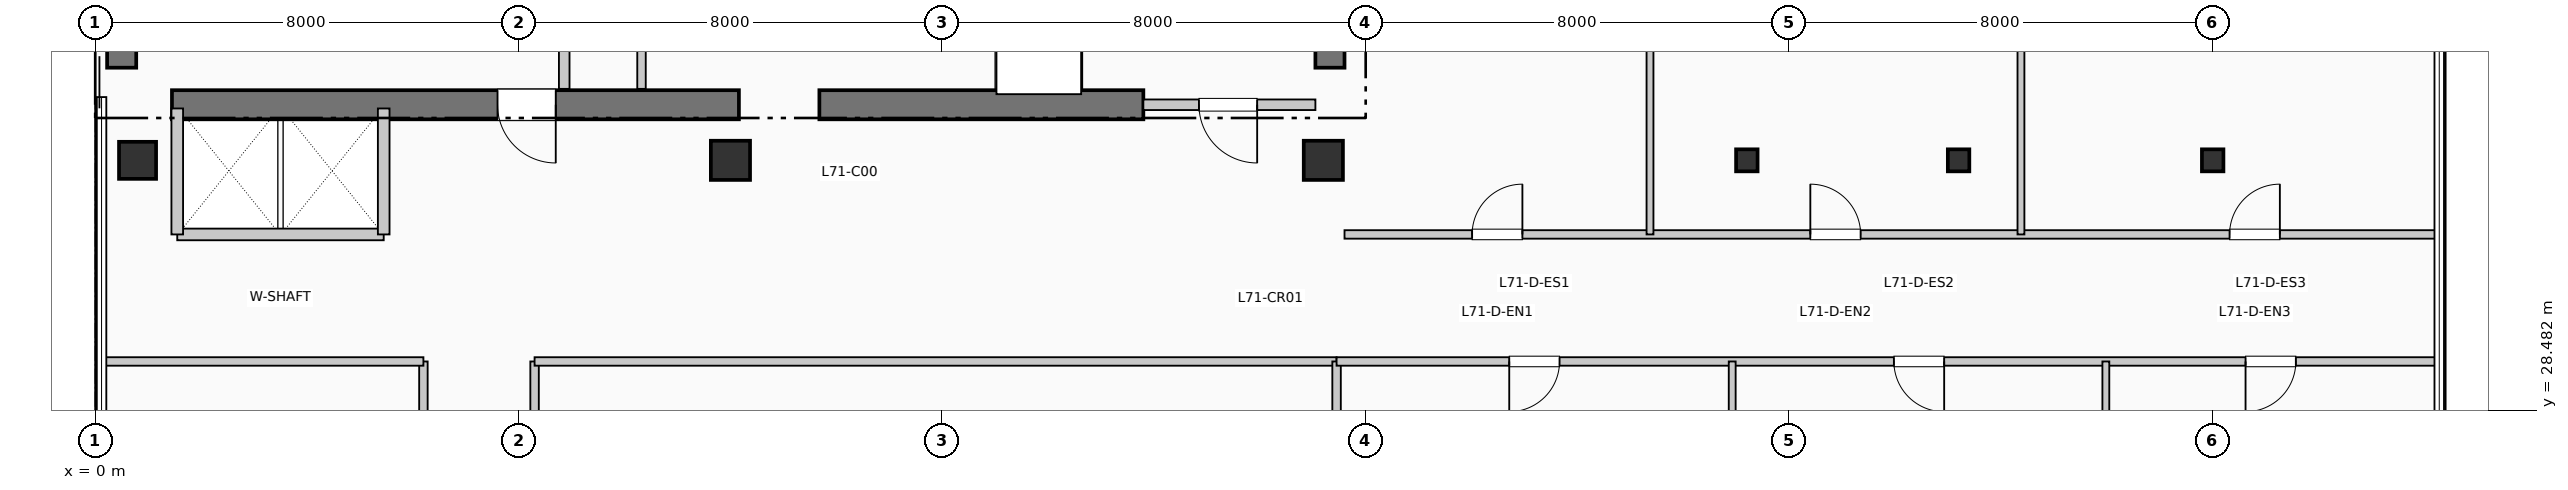
"""IFC4 building model, lengths in metres.
Left out: names, types, materials, properties, quantities, classifications, styles, units other than length and angle.
Written with IfcOpenShell. Run it as: python <this file> out.ifc"""

import sys

from ifc_helpers import new_model, si_unit, direction, frame, frame_2d, origin, origin_2d, place, context, subcontext, project, spatial, rectangle, i_section, extrude, element, fill, save


model = new_model("IFC4")
c1 = context("Model", 3, precision=1e-05, world=origin(), true_north=direction((0.0, 1.0)))
c2 = subcontext(c1, "Body", "Model", "MODEL_VIEW")
j1 = project(units=[si_unit("LENGTHUNIT", "METRE"), si_unit("PLANEANGLEUNIT", "RADIAN")], contexts=[c1])
p1 = place(None, origin())
s1 = spatial("IfcSite", under=j1, at=p1, CompositionType="ELEMENT")
p2 = place(p1, origin())
s2 = spatial("IfcBuilding", under=s1, at=p2, CompositionType="ELEMENT")
p3 = place(p2, frame((0.0, 0.0, 292.05)))
s3 = spatial("IfcBuildingStorey", under=s2, at=p3, CompositionType="ELEMENT", Elevation=292.05)
p4 = place(p3, frame((0.5, 34.95, 0.0), z_axis=(0.0, 0.0, 1.0), x_axis=(0.0, 1.0, 0.0)))
e1 = element("IfcWall", 1, at=p4, inside=s3, PredefinedType="SHEAR", context=c2, shape_type="SweptSolid", body=[
    extrude(rectangle(XDim=7.9, YDim=0.55, at=frame_2d((3.95, 0.0))), origin(), (0.0, 0.0, 1.0), 3.96),
])
p5 = place(p3, frame((23.325, 34.95, 0.0), z_axis=(0.0, 0.0, 1.0), x_axis=(0.0, 1.0, 0.0)))
e2 = element("IfcWall", 2, at=p5, inside=s3, PredefinedType="SHEAR", context=c2, shape_type="SweptSolid", body=[
    extrude(rectangle(XDim=10.64, YDim=0.55, at=frame_2d((5.32, 0.0))), origin(), (0.0, 0.0, 1.0), 3.96),
])
p6 = place(p3, frame((1.45, 34.25, 0.0), z_axis=(0.0, 0.0, 1.0), x_axis=(1.0, 0.0, 0.0)))
e3 = element("IfcWall", 3, at=p6, inside=s3, PredefinedType="SHEAR", context=c2, shape_type="SweptSolid", body=[
    extrude(rectangle(XDim=10.71, YDim=0.55, at=frame_2d((5.355, 0.0))), origin(), (0.0, 0.0, 1.0), 3.96),
])
p7 = place(p6, frame((7.25, 0.0, 0.0), z_axis=(0.0, 0.0, 1.0), x_axis=(-1.0, 0.0, 0.0)))
e4 = element("IfcOpeningElement", 4, at=p7, cuts=e3, PredefinedType="OPENING", context=c2, shape_type="SweptSolid", body=[
    extrude(rectangle(XDim=1.1, YDim=2.15, at=frame_2d((0.55, 1.075))), frame((0.0, 0.285, 0.0), z_axis=(0.0, -1.0, 0.0), x_axis=(1.0, 0.0, 0.0)), (0.0, 0.0, 1.0), 0.57),
])
p8 = place(p3, frame((13.68, 34.25, 0.0), z_axis=(0.0, 0.0, 1.0), x_axis=(1.0, 0.0, 0.0)))
e5 = element("IfcWall", 5, at=p8, inside=s3, PredefinedType="SHEAR", context=c2, shape_type="SweptSolid", body=[
    extrude(rectangle(XDim=6.12, YDim=0.55, at=frame_2d((3.06, 0.0))), origin(), (0.0, 0.0, 1.0), 3.96),
])
p9 = place(p3, frame((0.8, 33.2, 0.0), z_axis=(0.0, 0.0, 1.0), x_axis=(1.0, 0.0, 0.0)))
e6 = element("IfcColumn", 6, at=p9, inside=s3, PredefinedType="COLUMN", context=c2, shape_type="SweptSolid", body=[
    extrude(rectangle(XDim=0.7, YDim=0.7, at=origin_2d()), origin(), (0.0, 0.0, 1.0), 3.96),
])
for number, where, z_axis, x_axis in (
    (7, (12.0, 33.2, 0.0), (0.0, 0.0, 1.0), (1.0, 0.0, 0.0)),
    (8, (23.2, 33.2, 0.0), (0.0, 0.0, 1.0), (1.0, 0.0, 0.0)),
):
    element("IfcColumn", number, at=place(p3, frame(where, z_axis=z_axis, x_axis=x_axis)), inside=s3, PredefinedType="COLUMN", context=c2, shape_type="SweptSolid", body=[
        extrude(rectangle(XDim=0.74, YDim=0.74, at=origin_2d()), origin(), (0.0, 0.0, 1.0), 3.96),
    ])
for number, where, z_axis, x_axis in (
    (9, (31.2, 33.2, 0.0), (0.0, 0.0, 1.0), (1.0, 0.0, 0.0)),
    (10, (35.2, 33.2, 0.0), (0.0, 0.0, 1.0), (1.0, 0.0, 0.0)),
    (11, (40.0, 33.2, 0.0), (0.0, 0.0, 1.0), (1.0, 0.0, 0.0)),
):
    element("IfcColumn", number, at=place(p3, frame(where, z_axis=z_axis, x_axis=x_axis)), inside=s3, PredefinedType="COLUMN", context=c2, shape_type="SweptSolid", body=[
        extrude(i_section(OverallWidth=0.406, OverallDepth=0.416, WebThickness=0.022, FlangeThickness=0.036, at=origin_2d()), origin(), (0.0, 0.0, 1.0), 3.96),
    ])
p10 = place(p3, frame((8.86, 34.55, 0.0), z_axis=(0.0, 0.0, 1.0), x_axis=(0.0, 1.0, 0.0)))
e12 = element("IfcWall", 12, at=p10, inside=s3, PredefinedType="PARTITIONING", context=c2, shape_type="SweptSolid", body=[
    extrude(rectangle(XDim=2.5, YDim=0.2, at=frame_2d((1.25, 0.0))), origin(), (0.0, 0.0, 1.0), 3.74),
])
p11 = place(p3, frame((19.8, 34.25, 0.0), z_axis=(0.0, 0.0, 1.0), x_axis=(1.0, 0.0, 0.0)))
e13 = element("IfcWall", 13, at=p11, inside=s3, PredefinedType="PARTITIONING", context=c2, shape_type="SweptSolid", body=[
    extrude(rectangle(XDim=3.25, YDim=0.2, at=frame_2d((1.625, 0.0))), origin(), (0.0, 0.0, 1.0), 3.74),
])
p12 = place(p11, frame((2.15, 0.0, 0.0), z_axis=(0.0, 0.0, 1.0), x_axis=(-1.0, 0.0, 0.0)))
e14 = element("IfcOpeningElement", 14, at=p12, cuts=e13, PredefinedType="OPENING", context=c2, shape_type="SweptSolid", body=[
    extrude(rectangle(XDim=1.1, YDim=2.15, at=frame_2d((0.55, 1.075))), frame((0.0, 0.11, 0.0), z_axis=(0.0, -1.0, 0.0), x_axis=(1.0, 0.0, 0.0)), (0.0, 0.0, 1.0), 0.22),
])
p13 = place(p3, frame((1.55, 31.8, 0.0), z_axis=(0.0, 0.0, 1.0), x_axis=(1.0, 0.0, 0.0)))
e15 = element("IfcWall", 15, at=p13, inside=s3, PredefinedType="PARTITIONING", context=c2, shape_type="SweptSolid", body=[
    extrude(rectangle(XDim=3.9, YDim=0.22, at=frame_2d((1.95, 0.0))), origin(), (0.0, 0.0, 1.0), 3.74),
])
for number, where, z_axis, x_axis in (
    (16, (1.55, 31.8, 0.0), (0.0, 0.0, 1.0), (0.0, 1.0, 0.0)),
    (17, (5.45, 31.8, 0.0), (0.0, 0.0, 1.0), (0.0, 1.0, 0.0)),
):
    element("IfcWall", number, at=place(p3, frame(where, z_axis=z_axis, x_axis=x_axis)), inside=s3, PredefinedType="PARTITIONING", context=c2, shape_type="SweptSolid", body=[
        extrude(rectangle(XDim=2.38, YDim=0.22, at=frame_2d((1.19, 0.0))), origin(), (0.0, 0.0, 1.0), 3.74),
    ])
p14 = place(p3, frame((10.32, 34.55, 0.0), z_axis=(0.0, 0.0, 1.0), x_axis=(0.0, 1.0, 0.0)))
e18 = element("IfcWall", 18, at=p14, inside=s3, PredefinedType="PARTITIONING", context=c2, shape_type="SweptSolid", body=[
    extrude(rectangle(XDim=2.15, YDim=0.16, at=frame_2d((1.075, 0.0))), origin(), (0.0, 0.0, 1.0), 3.74),
])
p15 = place(p3, frame((6.2, 10.3, 0.0), z_axis=(0.0, 0.0, 1.0), x_axis=(0.0, 1.0, 0.0)))
e19 = element("IfcWall", 19, at=p15, inside=s3, PredefinedType="PARTITIONING", context=c2, shape_type="SweptSolid", body=[
    extrude(rectangle(XDim=19.1, YDim=0.16, at=frame_2d((9.55, 0.0))), origin(), (0.0, 0.0, 1.0), 3.74),
])
p16 = place(p15, frame((3.531, 0.0, 0.0), z_axis=(0.0, 0.0, 1.0), x_axis=(-1.0, 0.0, 0.0)))
e20 = element("IfcOpeningElement", 20, at=p16, cuts=e19, PredefinedType="OPENING", context=c2, shape_type="SweptSolid", body=[
    extrude(rectangle(XDim=0.95, YDim=2.15, at=frame_2d((0.475, 1.075))), frame((0.0, 0.09, 0.0), z_axis=(0.0, -1.0, 0.0), x_axis=(1.0, 0.0, 0.0)), (0.0, 0.0, 1.0), 0.18),
])
p17 = place(p15, frame((9.739, 0.0, 0.0), z_axis=(0.0, 0.0, 1.0), x_axis=(-1.0, 0.0, 0.0)))
e21 = element("IfcOpeningElement", 21, at=p17, cuts=e19, PredefinedType="OPENING", context=c2, shape_type="SweptSolid", body=[
    extrude(rectangle(XDim=0.95, YDim=2.15, at=frame_2d((0.475, 1.075))), frame((0.0, 0.09, 0.0), z_axis=(0.0, -1.0, 0.0), x_axis=(1.0, 0.0, 0.0)), (0.0, 0.0, 1.0), 0.18),
])
p18 = place(p15, frame((16.232, 0.0, 0.0), z_axis=(0.0, 0.0, 1.0), x_axis=(-1.0, 0.0, 0.0)))
e22 = element("IfcOpeningElement", 22, at=p18, cuts=e19, PredefinedType="OPENING", context=c2, shape_type="SweptSolid", body=[
    extrude(rectangle(XDim=0.95, YDim=2.15, at=frame_2d((0.475, 1.075))), frame((0.0, 0.09, 0.0), z_axis=(0.0, -1.0, 0.0), x_axis=(1.0, 0.0, 0.0)), (0.0, 0.0, 1.0), 0.18),
])
p19 = place(p3, frame((8.3, 10.3, 0.0), z_axis=(0.0, 0.0, 1.0), x_axis=(0.0, 1.0, 0.0)))
e23 = element("IfcWall", 23, at=p19, inside=s3, PredefinedType="PARTITIONING", context=c2, shape_type="SweptSolid", body=[
    extrude(rectangle(XDim=19.1, YDim=0.16, at=frame_2d((9.55, 0.0))), origin(), (0.0, 0.0, 1.0), 3.74),
])
p20 = place(p19, frame((1.626, 0.0, 0.0)))
e24 = element("IfcOpeningElement", 24, at=p20, cuts=e23, PredefinedType="OPENING", context=c2, shape_type="SweptSolid", body=[
    extrude(rectangle(XDim=0.95, YDim=2.15, at=frame_2d((0.475, 1.075))), frame((0.0, 0.09, 0.0), z_axis=(0.0, -1.0, 0.0), x_axis=(1.0, 0.0, 0.0)), (0.0, 0.0, 1.0), 0.18),
])
p21 = place(p19, frame((6.21, 0.0, 0.0)))
e25 = element("IfcOpeningElement", 25, at=p21, cuts=e23, PredefinedType="OPENING", context=c2, shape_type="SweptSolid", body=[
    extrude(rectangle(XDim=0.95, YDim=2.15, at=frame_2d((0.475, 1.075))), frame((0.0, 0.09, 0.0), z_axis=(0.0, -1.0, 0.0), x_axis=(1.0, 0.0, 0.0)), (0.0, 0.0, 1.0), 0.18),
])
p22 = place(p19, frame((11.367, 0.0, 0.0)))
e26 = element("IfcOpeningElement", 26, at=p22, cuts=e23, PredefinedType="OPENING", context=c2, shape_type="SweptSolid", body=[
    extrude(rectangle(XDim=0.95, YDim=2.15, at=frame_2d((0.475, 1.075))), frame((0.0, 0.09, 0.0), z_axis=(0.0, -1.0, 0.0), x_axis=(1.0, 0.0, 0.0)), (0.0, 0.0, 1.0), 0.18),
])
p23 = place(p19, frame((16.333, 0.0, 0.0)))
e27 = element("IfcOpeningElement", 27, at=p23, cuts=e23, PredefinedType="OPENING", context=c2, shape_type="SweptSolid", body=[
    extrude(rectangle(XDim=0.95, YDim=2.15, at=frame_2d((0.475, 1.075))), frame((0.0, 0.09, 0.0), z_axis=(0.0, -1.0, 0.0), x_axis=(1.0, 0.0, 0.0)), (0.0, 0.0, 1.0), 0.18),
])
p24 = place(p3, frame((0.19, 29.4, 0.0), z_axis=(0.0, 0.0, 1.0), x_axis=(1.0, 0.0, 0.0)))
e28 = element("IfcWall", 28, at=p24, inside=s3, PredefinedType="PARTITIONING", context=c2, shape_type="SweptSolid", body=[
    extrude(rectangle(XDim=6.01, YDim=0.16, at=frame_2d((3.005, 0.0))), origin(), (0.0, 0.0, 1.0), 3.425),
])
p25 = place(p3, frame((8.3, 29.4, 0.0), z_axis=(0.0, 0.0, 1.0), x_axis=(1.0, 0.0, 0.0)))
e29 = element("IfcWall", 29, at=p25, inside=s3, PredefinedType="PARTITIONING", context=c2, shape_type="SweptSolid", body=[
    extrude(rectangle(XDim=15.15, YDim=0.16, at=frame_2d((7.575, 0.0))), origin(), (0.0, 0.0, 1.0), 3.425),
])
p26 = place(p3, frame((23.45, 5.99, 0.0), z_axis=(0.0, 0.0, 1.0), x_axis=(0.0, 1.0, 0.0)))
e30 = element("IfcWall", 30, at=p26, inside=s3, PredefinedType="PARTITIONING", context=c2, shape_type="SweptSolid", body=[
    extrude(rectangle(XDim=23.41, YDim=0.16, at=frame_2d((11.705, 0.0))), origin(), (0.0, 0.0, 1.0), 3.175),
])
p27 = place(p3, frame((23.45, 29.4, 0.0), z_axis=(0.0, 0.0, 1.0), x_axis=(1.0, 0.0, 0.0)))
e31 = element("IfcWall", 31, at=p27, inside=s3, PredefinedType="PARTITIONING", context=c2, shape_type="SweptSolid", body=[
    extrude(rectangle(XDim=20.76, YDim=0.16, at=frame_2d((10.38, 0.0))), origin(), (0.0, 0.0, 1.0), 3.425),
])
p28 = place(p27, frame((4.212, 0.0, 0.0), z_axis=(0.0, 0.0, 1.0), x_axis=(-1.0, 0.0, 0.0)))
e32 = element("IfcOpeningElement", 32, at=p28, cuts=e31, PredefinedType="OPENING", context=c2, shape_type="SweptSolid", body=[
    extrude(rectangle(XDim=0.95, YDim=2.15, at=frame_2d((0.475, 1.075))), frame((0.0, 0.09, 0.0), z_axis=(0.0, -1.0, 0.0), x_axis=(1.0, 0.0, 0.0)), (0.0, 0.0, 1.0), 0.18),
])
p29 = place(p27, frame((11.478, 0.0, 0.0), z_axis=(0.0, 0.0, 1.0), x_axis=(-1.0, 0.0, 0.0)))
e33 = element("IfcOpeningElement", 33, at=p29, cuts=e31, PredefinedType="OPENING", context=c2, shape_type="SweptSolid", body=[
    extrude(rectangle(XDim=0.95, YDim=2.15, at=frame_2d((0.475, 1.075))), frame((0.0, 0.09, 0.0), z_axis=(0.0, -1.0, 0.0), x_axis=(1.0, 0.0, 0.0)), (0.0, 0.0, 1.0), 0.18),
])
p30 = place(p27, frame((18.121, 0.0, 0.0), z_axis=(0.0, 0.0, 1.0), x_axis=(-1.0, 0.0, 0.0)))
e34 = element("IfcOpeningElement", 34, at=p30, cuts=e31, PredefinedType="OPENING", context=c2, shape_type="SweptSolid", body=[
    extrude(rectangle(XDim=0.95, YDim=2.15, at=frame_2d((0.475, 1.075))), frame((0.0, 0.09, 0.0), z_axis=(0.0, -1.0, 0.0), x_axis=(1.0, 0.0, 0.0)), (0.0, 0.0, 1.0), 0.18),
])
p31 = place(p3, frame((23.6, 31.8, 0.0), z_axis=(0.0, 0.0, 1.0), x_axis=(1.0, 0.0, 0.0)))
e35 = element("IfcWall", 35, at=p31, inside=s3, PredefinedType="PARTITIONING", context=c2, shape_type="SweptSolid", body=[
    extrude(rectangle(XDim=20.61, YDim=0.16, at=frame_2d((10.305, 0.0))), origin(), (0.0, 0.0, 1.0), 3.74),
])
p32 = place(p31, frame((2.41, 0.0, 0.0)))
e36 = element("IfcOpeningElement", 36, at=p32, cuts=e35, PredefinedType="OPENING", context=c2, shape_type="SweptSolid", body=[
    extrude(rectangle(XDim=0.95, YDim=2.15, at=frame_2d((0.475, 1.075))), frame((0.0, 0.09, 0.0), z_axis=(0.0, -1.0, 0.0), x_axis=(1.0, 0.0, 0.0)), (0.0, 0.0, 1.0), 0.18),
])
p33 = place(p31, frame((8.8, 0.0, 0.0)))
e37 = element("IfcOpeningElement", 37, at=p33, cuts=e35, PredefinedType="OPENING", context=c2, shape_type="SweptSolid", body=[
    extrude(rectangle(XDim=0.95, YDim=2.15, at=frame_2d((0.475, 1.075))), frame((0.0, 0.09, 0.0), z_axis=(0.0, -1.0, 0.0), x_axis=(1.0, 0.0, 0.0)), (0.0, 0.0, 1.0), 0.18),
])
p34 = place(p31, frame((16.719, 0.0, 0.0)))
e38 = element("IfcOpeningElement", 38, at=p34, cuts=e35, PredefinedType="OPENING", context=c2, shape_type="SweptSolid", body=[
    extrude(rectangle(XDim=0.95, YDim=2.15, at=frame_2d((0.475, 1.075))), frame((0.0, 0.09, 0.0), z_axis=(0.0, -1.0, 0.0), x_axis=(1.0, 0.0, 0.0)), (0.0, 0.0, 1.0), 0.18),
])
p35 = place(p3, frame((30.924, 25.19, 0.0), z_axis=(0.0, 0.0, 1.0), x_axis=(0.0, 1.0, 0.0)))
e39 = element("IfcWall", 39, at=p35, inside=s3, PredefinedType="PARTITIONING", context=c2, shape_type="SweptSolid", body=[
    extrude(rectangle(XDim=4.21, YDim=0.13, at=frame_2d((2.105, 0.0))), origin(), (0.0, 0.0, 1.0), 3.175),
])
p36 = place(p3, frame((37.982, 25.19, 0.0), z_axis=(0.0, 0.0, 1.0), x_axis=(0.0, 1.0, 0.0)))
e40 = element("IfcWall", 40, at=p36, inside=s3, PredefinedType="PARTITIONING", context=c2, shape_type="SweptSolid", body=[
    extrude(rectangle(XDim=4.21, YDim=0.13, at=frame_2d((2.105, 0.0))), origin(), (0.0, 0.0, 1.0), 3.74),
])
for number, where, z_axis, x_axis in (
    (41, (29.371, 31.8, 0.0), (0.0, 0.0, 1.0), (0.0, 1.0, 0.0)),
    (42, (36.378, 31.8, 0.0), (0.0, 0.0, 1.0), (0.0, 1.0, 0.0)),
):
    element("IfcWall", number, at=place(p3, frame(where, z_axis=z_axis, x_axis=x_axis)), inside=s3, PredefinedType="PARTITIONING", context=c2, shape_type="SweptSolid", body=[
        extrude(rectangle(XDim=14.01, YDim=0.13, at=frame_2d((7.005, 0.0))), origin(), (0.0, 0.0, 1.0), 3.74),
    ])
p37 = place(p7, origin())
e43 = element("IfcDoor", 43, at=p37, inside=s3, OperationType="SINGLE_SWING_RIGHT", PredefinedType="DOOR", context=c2, shape_type="SweptSolid", body=[
    extrude(rectangle(XDim=1.1, YDim=2.15, at=frame_2d((0.55, 1.075))), frame((0.0, 0.025, 0.0), z_axis=(0.0, -1.0, 0.0), x_axis=(1.0, 0.0, 0.0)), (0.0, 0.0, 1.0), 0.05),
])
fill(e4, e43)
p38 = place(p12, origin())
e44 = element("IfcDoor", 44, at=p38, inside=s3, OperationType="SINGLE_SWING_RIGHT", PredefinedType="DOOR", context=c2, shape_type="SweptSolid", body=[
    extrude(rectangle(XDim=1.1, YDim=2.15, at=frame_2d((0.55, 1.075))), frame((0.0, 0.025, 0.0), z_axis=(0.0, -1.0, 0.0), x_axis=(1.0, 0.0, 0.0)), (0.0, 0.0, 1.0), 0.05),
])
fill(e14, e44)
p39 = place(p28, origin())
e45 = element("IfcDoor", 45, at=p39, inside=s3, OperationType="SINGLE_SWING_LEFT", PredefinedType="DOOR", context=c2, shape_type="SweptSolid", body=[
    extrude(rectangle(XDim=0.95, YDim=2.15, at=frame_2d((0.475, 1.075))), frame((0.0, 0.025, 0.0), z_axis=(0.0, -1.0, 0.0), x_axis=(1.0, 0.0, 0.0)), (0.0, 0.0, 1.0), 0.05),
])
fill(e32, e45)
p40 = place(p29, origin())
e46 = element("IfcDoor", 46, at=p40, inside=s3, OperationType="SINGLE_SWING_RIGHT", PredefinedType="DOOR", context=c2, shape_type="SweptSolid", body=[
    extrude(rectangle(XDim=0.95, YDim=2.15, at=frame_2d((0.475, 1.075))), frame((0.0, 0.025, 0.0), z_axis=(0.0, -1.0, 0.0), x_axis=(1.0, 0.0, 0.0)), (0.0, 0.0, 1.0), 0.05),
])
fill(e33, e46)
p41 = place(p30, origin())
e47 = element("IfcDoor", 47, at=p41, inside=s3, OperationType="SINGLE_SWING_LEFT", PredefinedType="DOOR", context=c2, shape_type="SweptSolid", body=[
    extrude(rectangle(XDim=0.95, YDim=2.15, at=frame_2d((0.475, 1.075))), frame((0.0, 0.025, 0.0), z_axis=(0.0, -1.0, 0.0), x_axis=(1.0, 0.0, 0.0)), (0.0, 0.0, 1.0), 0.05),
])
fill(e34, e47)
p42 = place(p32, origin())
e48 = element("IfcDoor", 48, at=p42, inside=s3, OperationType="SINGLE_SWING_RIGHT", PredefinedType="DOOR", context=c2, shape_type="SweptSolid", body=[
    extrude(rectangle(XDim=0.95, YDim=2.15, at=frame_2d((0.475, 1.075))), frame((0.0, 0.025, 0.0), z_axis=(0.0, -1.0, 0.0), x_axis=(1.0, 0.0, 0.0)), (0.0, 0.0, 1.0), 0.05),
])
fill(e36, e48)
p43 = place(p33, origin())
e49 = element("IfcDoor", 49, at=p43, inside=s3, OperationType="SINGLE_SWING_LEFT", PredefinedType="DOOR", context=c2, shape_type="SweptSolid", body=[
    extrude(rectangle(XDim=0.95, YDim=2.15, at=frame_2d((0.475, 1.075))), frame((0.0, 0.025, 0.0), z_axis=(0.0, -1.0, 0.0), x_axis=(1.0, 0.0, 0.0)), (0.0, 0.0, 1.0), 0.05),
])
fill(e37, e49)
p44 = place(p34, origin())
e50 = element("IfcDoor", 50, at=p44, inside=s3, OperationType="SINGLE_SWING_RIGHT", PredefinedType="DOOR", context=c2, shape_type="SweptSolid", body=[
    extrude(rectangle(XDim=0.95, YDim=2.15, at=frame_2d((0.475, 1.075))), frame((0.0, 0.025, 0.0), z_axis=(0.0, -1.0, 0.0), x_axis=(1.0, 0.0, 0.0)), (0.0, 0.0, 1.0), 0.05),
])
fill(e38, e50)
save(model, sys.argv[1])
